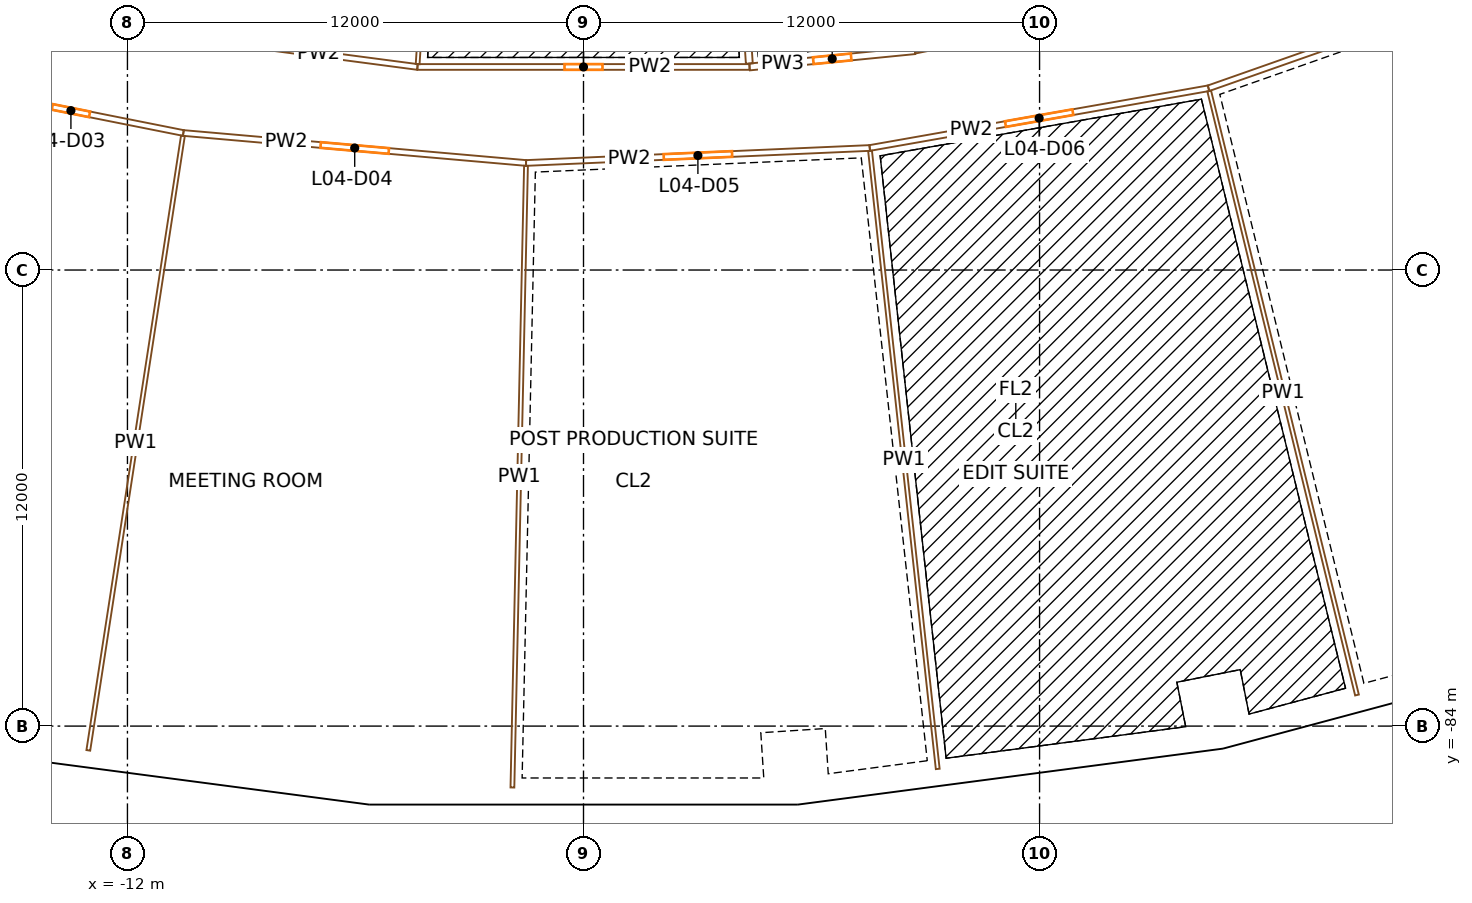
"""IFC4 building model, lengths in metres.
Left out: names, types, materials, properties, quantities, classifications, styles, units other than length and angle.
Written with IfcOpenShell. Run it as: python <this file> out.ifc"""

import sys

from ifc_helpers import new_model, si_unit, direction, frame, frame_2d, origin, origin_2d, place, context, subcontext, project, spatial, rectangle, extrude, element, fill, save


model = new_model("IFC4")
c1 = context("Model", 3, precision=1e-05, world=origin(), true_north=direction((0.0, 1.0)))
c2 = subcontext(c1, "Body", "Model", "MODEL_VIEW")
j1 = project(units=[si_unit("LENGTHUNIT", "METRE"), si_unit("PLANEANGLEUNIT", "RADIAN")], contexts=[c1])
p1 = place(None, origin())
s1 = spatial("IfcSite", under=j1, at=p1, CompositionType="ELEMENT")
p2 = place(p1, origin())
s2 = spatial("IfcBuilding", under=s1, at=p2, CompositionType="ELEMENT")
p3 = place(p2, frame((0.0, 0.0, 31.5)))
s3 = spatial("IfcBuildingStorey", under=s2, at=p3, CompositionType="ELEMENT", Elevation=31.5)
p4 = place(p3, frame((-5.085, -77.583, 0.0), z_axis=(0.0, 0.0, 1.0), x_axis=(0.997858923239, -0.06540312923, 0.0)))
e1 = element("IfcColumn", 1, at=p4, inside=s3, PredefinedType="COLUMN", context=c2, shape_type="SweptSolid", body=[
    extrude(rectangle(XDim=1.4, YDim=1.8, at=origin_2d()), origin(), (0.0, 0.0, 1.0), 4.5),
])
p5 = place(p3, frame((-5.576, -85.067, 0.0), z_axis=(0.0, 0.0, 1.0), x_axis=(0.997858923239, -0.06540312923, 0.0)))
e2 = element("IfcColumn", 2, at=p5, inside=s3, PredefinedType="COLUMN", context=c2, shape_type="SweptSolid", body=[
    extrude(rectangle(XDim=1.1, YDim=1.3, at=origin_2d()), origin(), (0.0, 0.0, 1.0), 4.5),
])
p6 = place(p3, frame((5.085, -77.583, 0.0), z_axis=(0.0, 0.0, 1.0), x_axis=(0.997858923239, 0.06540312923, 0.0)))
e3 = element("IfcColumn", 3, at=p6, inside=s3, PredefinedType="COLUMN", context=c2, shape_type="SweptSolid", body=[
    extrude(rectangle(XDim=1.4, YDim=1.8, at=origin_2d()), origin(), (0.0, 0.0, 1.0), 4.5),
])
p7 = place(p3, frame((5.576, -85.067, 0.0), z_axis=(0.0, 0.0, 1.0), x_axis=(0.997858923239, 0.06540312923, 0.0)))
e4 = element("IfcColumn", 4, at=p7, inside=s3, PredefinedType="COLUMN", context=c2, shape_type="SweptSolid", body=[
    extrude(rectangle(XDim=1.1, YDim=1.3, at=origin_2d()), origin(), (0.0, 0.0, 1.0), 4.5),
])
p8 = place(p3, frame((15.168, -76.256, 0.0), z_axis=(0.0, 0.0, 1.0), x_axis=(0.980785280403, 0.195090322016, 0.0)))
e5 = element("IfcColumn", 5, at=p8, inside=s3, PredefinedType="COLUMN", context=c2, shape_type="SweptSolid", body=[
    extrude(rectangle(XDim=1.4, YDim=1.8, at=origin_2d()), origin(), (0.0, 0.0, 1.0), 4.5),
])
p9 = place(p3, frame((16.631, -83.612, 0.0), z_axis=(0.0, 0.0, 1.0), x_axis=(0.980785280403, 0.195090322016, 0.0)))
e6 = element("IfcColumn", 6, at=p9, inside=s3, PredefinedType="COLUMN", context=c2, shape_type="SweptSolid", body=[
    extrude(rectangle(XDim=1.1, YDim=1.3, at=origin_2d()), origin(), (0.0, 0.0, 1.0), 4.5),
])
p10 = place(p3, frame((-5.656, -85.84, 0.0), z_axis=(0.0, 0.0, 1.0), x_axis=(1.0, 0.0, 0.0)))
e7 = element("IfcWall", 7, at=p10, inside=s3, PredefinedType="SOLIDWALL", context=c2, shape_type="SweptSolid", body=[
    extrude(rectangle(XDim=11.312, YDim=0.45, at=frame_2d((5.656, 0.0))), origin(), (0.0, 0.0, 1.0), 3.2),
])
p11 = place(p10, frame((4.006, 0.0, 0.9)))
e8 = element("IfcOpeningElement", 8, at=p11, cuts=e7, PredefinedType="OPENING", context=c2, shape_type="SweptSolid", body=[
    extrude(rectangle(XDim=1.2, YDim=2.15, at=frame_2d((0.6, 1.075))), frame((0.0, 0.235, 0.0), z_axis=(0.0, -1.0, 0.0), x_axis=(1.0, 0.0, 0.0)), (0.0, 0.0, 1.0), 0.47),
])
p12 = place(p10, frame((6.106, 0.0, 0.9)))
e9 = element("IfcOpeningElement", 9, at=p12, cuts=e7, PredefinedType="OPENING", context=c2, shape_type="SweptSolid", body=[
    extrude(rectangle(XDim=1.2, YDim=2.15, at=frame_2d((0.6, 1.075))), frame((0.0, 0.235, 0.0), z_axis=(0.0, -1.0, 0.0), x_axis=(1.0, 0.0, 0.0)), (0.0, 0.0, 1.0), 0.47),
])
p13 = place(p3, frame((5.685, -85.833, 0.0), z_axis=(0.0, 0.0, 1.0), x_axis=(0.991447502826, 0.130506126829, 0.0)))
e10 = element("IfcWall", 10, at=p13, inside=s3, PredefinedType="SOLIDWALL", context=c2, shape_type="SweptSolid", body=[
    extrude(rectangle(XDim=11.135, YDim=0.45, at=frame_2d((5.567, 0.0))), origin(), (0.0, 0.0, 1.0), 3.2),
])
p14 = place(p13, frame((3.917, 0.0, 0.9)))
e11 = element("IfcOpeningElement", 11, at=p14, cuts=e10, PredefinedType="OPENING", context=c2, shape_type="SweptSolid", body=[
    extrude(rectangle(XDim=1.2, YDim=2.15, at=frame_2d((0.6, 1.075))), frame((0.0, 0.235, 0.0), z_axis=(0.0, -1.0, 0.0), x_axis=(1.0, 0.0, 0.0)), (0.0, 0.0, 1.0), 0.47),
])
p15 = place(p13, frame((6.017, 0.0, 0.9)))
e12 = element("IfcOpeningElement", 12, at=p15, cuts=e10, PredefinedType="OPENING", context=c2, shape_type="SweptSolid", body=[
    extrude(rectangle(XDim=1.2, YDim=2.15, at=frame_2d((0.6, 1.075))), frame((0.0, 0.235, 0.0), z_axis=(0.0, -1.0, 0.0), x_axis=(1.0, 0.0, 0.0)), (0.0, 0.0, 1.0), 0.47),
])
p16 = place(p3, frame((16.754, -84.379, 0.0), z_axis=(0.0, 0.0, 1.0), x_axis=(0.965923678926, 0.258827059038, 0.0)))
e13 = element("IfcWall", 13, at=p16, inside=s3, PredefinedType="SOLIDWALL", context=c2, shape_type="SweptSolid", body=[
    extrude(rectangle(XDim=11.312, YDim=0.45, at=frame_2d((5.656, 0.0))), origin(), (0.0, 0.0, 1.0), 3.2),
])
p17 = place(p16, frame((4.006, 0.0, 0.9)))
e14 = element("IfcOpeningElement", 14, at=p17, cuts=e13, PredefinedType="OPENING", context=c2, shape_type="SweptSolid", body=[
    extrude(rectangle(XDim=1.2, YDim=2.15, at=frame_2d((0.6, 1.075))), frame((0.0, 0.235, 0.0), z_axis=(0.0, -1.0, 0.0), x_axis=(1.0, 0.0, 0.0)), (0.0, 0.0, 1.0), 0.47),
])
p18 = place(p16, frame((6.106, 0.0, 0.9)))
e15 = element("IfcOpeningElement", 15, at=p18, cuts=e13, PredefinedType="OPENING", context=c2, shape_type="SweptSolid", body=[
    extrude(rectangle(XDim=1.2, YDim=2.15, at=frame_2d((0.6, 1.075))), frame((0.0, 0.235, 0.0), z_axis=(0.0, -1.0, 0.0), x_axis=(1.0, 0.0, 0.0)), (0.0, 0.0, 1.0), 0.47),
])
p19 = place(p3, frame((-16.724, -84.379, 0.0), z_axis=(0.0, 0.0, 1.0), x_axis=(0.991447502826, -0.130506126829, 0.0)))
e16 = element("IfcWall", 16, at=p19, inside=s3, PredefinedType="SOLIDWALL", context=c2, shape_type="SweptSolid", body=[
    extrude(rectangle(XDim=11.135, YDim=0.45, at=frame_2d((5.567, 0.0))), origin(), (0.0, 0.0, 1.0), 3.2),
])
p20 = place(p19, frame((3.917, 0.0, 0.9)))
e17 = element("IfcOpeningElement", 17, at=p20, cuts=e16, PredefinedType="OPENING", context=c2, shape_type="SweptSolid", body=[
    extrude(rectangle(XDim=1.2, YDim=2.15, at=frame_2d((0.6, 1.075))), frame((0.0, 0.235, 0.0), z_axis=(0.0, -1.0, 0.0), x_axis=(1.0, 0.0, 0.0)), (0.0, 0.0, 1.0), 0.47),
])
p21 = place(p19, frame((6.017, 0.0, 0.9)))
e18 = element("IfcOpeningElement", 18, at=p21, cuts=e16, PredefinedType="OPENING", context=c2, shape_type="SweptSolid", body=[
    extrude(rectangle(XDim=1.2, YDim=2.15, at=frame_2d((0.6, 1.075))), frame((0.0, 0.235, 0.0), z_axis=(0.0, -1.0, 0.0), x_axis=(1.0, 0.0, 0.0)), (0.0, 0.0, 1.0), 0.47),
])
p22 = place(p3, frame((-10.529, -68.394, 0.0), z_axis=(0.0, 0.0, 1.0), x_axis=(-0.980785582749, 0.195088802015, 0.0)))
e19 = element("IfcWall", 19, at=p22, inside=s3, PredefinedType="PARTITIONING", context=c2, shape_type="SweptSolid", body=[
    extrude(rectangle(XDim=6.033, YDim=0.15, at=frame_2d((3.017, 0.0))), origin(), (0.0, 0.0, 1.0), 3.1),
])
p23 = place(p22, frame((2.517, 0.0, 0.0)))
e20 = element("IfcOpeningElement", 20, at=p23, cuts=e19, PredefinedType="OPENING", context=c2, shape_type="SweptSolid", body=[
    extrude(rectangle(XDim=1.0, YDim=2.1, at=frame_2d((0.5, 1.05))), frame((0.0, 0.085, 0.0), z_axis=(0.0, -1.0, 0.0), x_axis=(1.0, 0.0, 0.0)), (0.0, 0.0, 1.0), 0.17),
])
p24 = place(p3, frame((-13.03, -84.639, 0.0), z_axis=(0.0, 0.0, 1.0), x_axis=(0.15214688942, 0.988357892689, 0.0)))
e21 = element("IfcWall", 21, at=p24, inside=s3, PredefinedType="PARTITIONING", context=c2, shape_type="SweptSolid", body=[
    extrude(rectangle(XDim=16.361, YDim=0.1, at=frame_2d((8.18, 0.0))), origin(), (0.0, 0.0, 1.0), 3.1),
])
p25 = place(p3, frame((-13.032, -65.516, 0.0), z_axis=(0.0, 0.0, 1.0), x_axis=(0.991443260322, -0.130538352841, 0.0)))
e22 = element("IfcWall", 22, at=p25, inside=s3, PredefinedType="PARTITIONING", context=c2, shape_type="SweptSolid", body=[
    extrude(rectangle(XDim=8.738, YDim=0.15, at=frame_2d((4.369, 0.0))), origin(), (0.0, 0.0, 1.0), 3.1),
])
p26 = place(p25, frame((3.869, 0.0, 0.0)))
e23 = element("IfcOpeningElement", 23, at=p26, cuts=e22, PredefinedType="OPENING", context=c2, shape_type="SweptSolid", body=[
    extrude(rectangle(XDim=1.0, YDim=2.1, at=frame_2d((0.5, 1.05))), frame((0.0, 0.085, 0.0), z_axis=(0.0, -1.0, 0.0), x_axis=(1.0, 0.0, 0.0)), (0.0, 0.0, 1.0), 0.17),
])
p27 = place(p3, frame((-1.511, -69.184, 0.0), z_axis=(0.0, 0.0, 1.0), x_axis=(-0.996190935779, 0.087198735491, 0.0)))
e24 = element("IfcWall", 24, at=p27, inside=s3, PredefinedType="PARTITIONING", context=c2, shape_type="SweptSolid", body=[
    extrude(rectangle(XDim=9.052, YDim=0.15, at=frame_2d((4.526, 0.0))), origin(), (0.0, 0.0, 1.0), 3.1),
])
p28 = place(p27, frame((3.626, 0.0, 0.0)))
e25 = element("IfcOpeningElement", 25, at=p28, cuts=e24, PredefinedType="OPENING", context=c2, shape_type="SweptSolid", body=[
    extrude(rectangle(XDim=1.8, YDim=2.1, at=frame_2d((0.9, 1.05))), frame((0.0, 0.085, 0.0), z_axis=(0.0, -1.0, 0.0), x_axis=(1.0, 0.0, 0.0)), (0.0, 0.0, 1.0), 0.17),
])
p29 = place(p3, frame((-4.369, -66.657, 0.0), z_axis=(0.0, 0.0, 1.0), x_axis=(1.0, 0.0, 0.0)))
e26 = element("IfcWall", 26, at=p29, inside=s3, PredefinedType="PARTITIONING", context=c2, shape_type="SweptSolid", body=[
    extrude(rectangle(XDim=8.738, YDim=0.15, at=frame_2d((4.369, 0.0))), origin(), (0.0, 0.0, 1.0), 3.1),
])
p30 = place(p29, frame((3.869, 0.0, 0.0)))
e27 = element("IfcOpeningElement", 27, at=p30, cuts=e26, PredefinedType="OPENING", context=c2, shape_type="SweptSolid", body=[
    extrude(rectangle(XDim=1.0, YDim=2.1, at=frame_2d((0.5, 1.05))), frame((0.0, 0.085, 0.0), z_axis=(0.0, -1.0, 0.0), x_axis=(1.0, 0.0, 0.0)), (0.0, 0.0, 1.0), 0.17),
])
p31 = place(p3, frame((-3.283, -50.093, 0.0), z_axis=(0.0, 0.0, 1.0), x_axis=(-0.065405026615, -0.997858798876, 0.0)))
e28 = element("IfcWall", 28, at=p31, inside=s3, PredefinedType="PARTITIONING", context=c2, shape_type="SweptSolid", body=[
    extrude(rectangle(XDim=16.525, YDim=0.1, at=frame_2d((8.262, 0.0))), origin(), (0.0, 0.0, 1.0), 3.1),
])
p32 = place(p3, frame((-1.871, -85.615, 0.0), z_axis=(0.0, 0.0, 1.0), x_axis=(0.021846183574, 0.999761343653, 0.0)))
e29 = element("IfcWall", 29, at=p32, inside=s3, PredefinedType="PARTITIONING", context=c2, shape_type="SweptSolid", body=[
    extrude(rectangle(XDim=16.361, YDim=0.1, at=frame_2d((8.18, 0.0))), origin(), (0.0, 0.0, 1.0), 3.1),
])
p33 = place(p3, frame((7.532, -68.789, 0.0), z_axis=(0.0, 0.0, 1.0), x_axis=(-0.999048509506, -0.043612792308, 0.0)))
e30 = element("IfcWall", 30, at=p33, inside=s3, PredefinedType="PARTITIONING", context=c2, shape_type="SweptSolid", body=[
    extrude(rectangle(XDim=9.052, YDim=0.15, at=frame_2d((4.526, 0.0))), origin(), (0.0, 0.0, 1.0), 3.1),
])
p34 = place(p33, frame((3.626, 0.0, 0.0)))
e31 = element("IfcOpeningElement", 31, at=p34, cuts=e30, PredefinedType="OPENING", context=c2, shape_type="SweptSolid", body=[
    extrude(rectangle(XDim=1.8, YDim=2.1, at=frame_2d((0.9, 1.05))), frame((0.0, 0.085, 0.0), z_axis=(0.0, -1.0, 0.0), x_axis=(1.0, 0.0, 0.0)), (0.0, 0.0, 1.0), 0.17),
])
p35 = place(p3, frame((3.283, -50.093, 0.0), z_axis=(0.0, 0.0, 1.0), x_axis=(0.065405001109, -0.997858800547, 0.0)))
e32 = element("IfcWall", 32, at=p35, inside=s3, PredefinedType="PARTITIONING", context=c2, shape_type="SweptSolid", body=[
    extrude(rectangle(XDim=16.51, YDim=0.18, at=frame_2d((8.255, 0.0))), origin(), (0.0, 0.0, 1.0), 3.1),
])
p36 = place(p3, frame((4.369, -66.657, 0.0), z_axis=(0.0, 0.0, 1.0), x_axis=(0.995184826457, 0.098016127192, 0.0)))
e33 = element("IfcWall", 33, at=p36, inside=s3, PredefinedType="PARTITIONING", context=c2, shape_type="SweptSolid", body=[
    extrude(rectangle(XDim=4.371, YDim=0.18, at=frame_2d((2.186, 0.0))), origin(), (0.0, 0.0, 1.0), 3.1),
])
p37 = place(p36, frame((1.686, 0.0, 0.0)))
e34 = element("IfcOpeningElement", 34, at=p37, cuts=e33, PredefinedType="OPENING", context=c2, shape_type="SweptSolid", body=[
    extrude(rectangle(XDim=1.0, YDim=2.1, at=frame_2d((0.5, 1.05))), frame((0.0, 0.1, 0.0), z_axis=(0.0, -1.0, 0.0), x_axis=(1.0, 0.0, 0.0)), (0.0, 0.0, 1.0), 0.2),
])
p38 = place(p3, frame((16.446, -67.217, 0.0), z_axis=(0.0, 0.0, 1.0), x_axis=(-0.984813412134, -0.173616080133, 0.0)))
e35 = element("IfcWall", 35, at=p38, inside=s3, PredefinedType="PARTITIONING", context=c2, shape_type="SweptSolid", body=[
    extrude(rectangle(XDim=9.052, YDim=0.15, at=frame_2d((4.526, 0.0))), origin(), (0.0, 0.0, 1.0), 3.1),
])
p39 = place(p38, frame((3.626, 0.0, 0.0)))
e36 = element("IfcOpeningElement", 36, at=p39, cuts=e35, PredefinedType="OPENING", context=c2, shape_type="SweptSolid", body=[
    extrude(rectangle(XDim=1.8, YDim=2.1, at=frame_2d((0.9, 1.05))), frame((0.0, 0.085, 0.0), z_axis=(0.0, -1.0, 0.0), x_axis=(1.0, 0.0, 0.0)), (0.0, 0.0, 1.0), 0.17),
])
p40 = place(p3, frame((8.719, -66.229, 0.0), z_axis=(0.0, 0.0, 1.0), x_axis=(0.980786466832, 0.195084357342, 0.0)))
e37 = element("IfcWall", 37, at=p40, inside=s3, PredefinedType="PARTITIONING", context=c2, shape_type="SweptSolid", body=[
    extrude(rectangle(XDim=8.738, YDim=0.15, at=frame_2d((4.369, 0.0))), origin(), (0.0, 0.0, 1.0), 3.1),
])
p41 = place(p40, frame((3.869, 0.0, 0.0)))
e38 = element("IfcOpeningElement", 38, at=p41, cuts=e37, PredefinedType="OPENING", context=c2, shape_type="SweptSolid", body=[
    extrude(rectangle(XDim=1.0, YDim=2.1, at=frame_2d((0.5, 1.05))), frame((0.0, 0.085, 0.0), z_axis=(0.0, -1.0, 0.0), x_axis=(1.0, 0.0, 0.0)), (0.0, 0.0, 1.0), 0.17),
])
p42 = place(p3, frame((9.321, -85.127, 0.0), z_axis=(0.0, 0.0, 1.0), x_axis=(-0.1088427139, 0.99405898398, 0.0)))
e39 = element("IfcWall", 39, at=p42, inside=s3, PredefinedType="PARTITIONING", context=c2, shape_type="SweptSolid", body=[
    extrude(rectangle(XDim=16.361, YDim=0.1, at=frame_2d((8.18, 0.0))), origin(), (0.0, 0.0, 1.0), 3.1),
])
p43 = place(p3, frame((29.175, -62.741, 0.0), z_axis=(0.0, 0.0, 1.0), x_axis=(-0.94336986797, -0.33174281033, 0.0)))
e40 = element("IfcWall", 40, at=p43, inside=s3, PredefinedType="PARTITIONING", context=c2, shape_type="SweptSolid", body=[
    extrude(rectangle(XDim=13.493, YDim=0.15, at=frame_2d((6.746, 0.0))), origin(), (0.0, 0.0, 1.0), 3.1),
])
p44 = place(p43, frame((5.846, 0.0, 0.0)))
e41 = element("IfcOpeningElement", 41, at=p44, cuts=e40, PredefinedType="OPENING", context=c2, shape_type="SweptSolid", body=[
    extrude(rectangle(XDim=1.8, YDim=2.1, at=frame_2d((0.9, 1.05))), frame((0.0, 0.085, 0.0), z_axis=(0.0, -1.0, 0.0), x_axis=(1.0, 0.0, 0.0)), (0.0, 0.0, 1.0), 0.17),
])
p45 = place(p3, frame((20.352, -83.182, 0.0), z_axis=(0.0, 0.0, 1.0), x_axis=(-0.23765209547, 0.971350339228, 0.0)))
e42 = element("IfcWall", 42, at=p45, inside=s3, PredefinedType="PARTITIONING", context=c2, shape_type="SweptSolid", body=[
    extrude(rectangle(XDim=16.361, YDim=0.1, at=frame_2d((8.18, 0.0))), origin(), (0.0, 0.0, 1.0), 3.1),
])
p46 = place(p20, origin())
e43 = element("IfcWindow", 43, at=p46, inside=s3, PartitioningType="SINGLE_PANEL", PredefinedType="WINDOW", context=c2, shape_type="SweptSolid", body=[
    extrude(rectangle(XDim=1.2, YDim=2.15, at=frame_2d((0.6, 1.075))), frame((0.0, 0.03, 0.0), z_axis=(0.0, -1.0, 0.0), x_axis=(1.0, 0.0, 0.0)), (0.0, 0.0, 1.0), 0.06),
])
fill(e17, e43)
p47 = place(p21, origin())
e44 = element("IfcWindow", 44, at=p47, inside=s3, PartitioningType="SINGLE_PANEL", PredefinedType="WINDOW", context=c2, shape_type="SweptSolid", body=[
    extrude(rectangle(XDim=1.2, YDim=2.15, at=frame_2d((0.6, 1.075))), frame((0.0, 0.03, 0.0), z_axis=(0.0, -1.0, 0.0), x_axis=(1.0, 0.0, 0.0)), (0.0, 0.0, 1.0), 0.06),
])
fill(e18, e44)
p48 = place(p11, origin())
e45 = element("IfcWindow", 45, at=p48, inside=s3, PartitioningType="SINGLE_PANEL", PredefinedType="WINDOW", context=c2, shape_type="SweptSolid", body=[
    extrude(rectangle(XDim=1.2, YDim=2.15, at=frame_2d((0.6, 1.075))), frame((0.0, 0.03, 0.0), z_axis=(0.0, -1.0, 0.0), x_axis=(1.0, 0.0, 0.0)), (0.0, 0.0, 1.0), 0.06),
])
fill(e8, e45)
p49 = place(p12, origin())
e46 = element("IfcWindow", 46, at=p49, inside=s3, PartitioningType="SINGLE_PANEL", PredefinedType="WINDOW", context=c2, shape_type="SweptSolid", body=[
    extrude(rectangle(XDim=1.2, YDim=2.15, at=frame_2d((0.6, 1.075))), frame((0.0, 0.03, 0.0), z_axis=(0.0, -1.0, 0.0), x_axis=(1.0, 0.0, 0.0)), (0.0, 0.0, 1.0), 0.06),
])
fill(e9, e46)
p50 = place(p14, origin())
e47 = element("IfcWindow", 47, at=p50, inside=s3, PartitioningType="SINGLE_PANEL", PredefinedType="WINDOW", context=c2, shape_type="SweptSolid", body=[
    extrude(rectangle(XDim=1.2, YDim=2.15, at=frame_2d((0.6, 1.075))), frame((0.0, 0.03, 0.0), z_axis=(0.0, -1.0, 0.0), x_axis=(1.0, 0.0, 0.0)), (0.0, 0.0, 1.0), 0.06),
])
fill(e11, e47)
p51 = place(p15, origin())
e48 = element("IfcWindow", 48, at=p51, inside=s3, PartitioningType="SINGLE_PANEL", PredefinedType="WINDOW", context=c2, shape_type="SweptSolid", body=[
    extrude(rectangle(XDim=1.2, YDim=2.15, at=frame_2d((0.6, 1.075))), frame((0.0, 0.03, 0.0), z_axis=(0.0, -1.0, 0.0), x_axis=(1.0, 0.0, 0.0)), (0.0, 0.0, 1.0), 0.06),
])
fill(e12, e48)
p52 = place(p17, origin())
e49 = element("IfcWindow", 49, at=p52, inside=s3, PartitioningType="SINGLE_PANEL", PredefinedType="WINDOW", context=c2, shape_type="SweptSolid", body=[
    extrude(rectangle(XDim=1.2, YDim=2.15, at=frame_2d((0.6, 1.075))), frame((0.0, 0.03, 0.0), z_axis=(0.0, -1.0, 0.0), x_axis=(1.0, 0.0, 0.0)), (0.0, 0.0, 1.0), 0.06),
])
fill(e14, e49)
p53 = place(p23, origin())
e50 = element("IfcDoor", 50, at=p53, inside=s3, OperationType="SINGLE_SWING_RIGHT", PredefinedType="DOOR", context=c2, shape_type="SweptSolid", body=[
    extrude(rectangle(XDim=1.0, YDim=2.1, at=frame_2d((0.5, 1.05))), frame((0.0, 0.025, 0.0), z_axis=(0.0, -1.0, 0.0), x_axis=(1.0, 0.0, 0.0)), (0.0, 0.0, 1.0), 0.05),
])
fill(e20, e50)
p54 = place(p28, origin())
e51 = element("IfcDoor", 51, at=p54, inside=s3, OperationType="DOUBLE_DOOR_SINGLE_SWING", PredefinedType="DOOR", context=c2, shape_type="SweptSolid", body=[
    extrude(rectangle(XDim=1.8, YDim=2.1, at=frame_2d((0.9, 1.05))), frame((0.0, 0.025, 0.0), z_axis=(0.0, -1.0, 0.0), x_axis=(1.0, 0.0, 0.0)), (0.0, 0.0, 1.0), 0.05),
])
fill(e25, e51)
p55 = place(p34, origin())
e52 = element("IfcDoor", 52, at=p55, inside=s3, OperationType="DOUBLE_DOOR_SINGLE_SWING", PredefinedType="DOOR", context=c2, shape_type="SweptSolid", body=[
    extrude(rectangle(XDim=1.8, YDim=2.1, at=frame_2d((0.9, 1.05))), frame((0.0, 0.025, 0.0), z_axis=(0.0, -1.0, 0.0), x_axis=(1.0, 0.0, 0.0)), (0.0, 0.0, 1.0), 0.05),
])
fill(e31, e52)
p56 = place(p39, origin())
e53 = element("IfcDoor", 53, at=p56, inside=s3, OperationType="DOUBLE_DOOR_SINGLE_SWING", PredefinedType="DOOR", context=c2, shape_type="SweptSolid", body=[
    extrude(rectangle(XDim=1.8, YDim=2.1, at=frame_2d((0.9, 1.05))), frame((0.0, 0.025, 0.0), z_axis=(0.0, -1.0, 0.0), x_axis=(1.0, 0.0, 0.0)), (0.0, 0.0, 1.0), 0.05),
])
fill(e36, e53)
p57 = place(p30, origin())
e54 = element("IfcDoor", 54, at=p57, inside=s3, OperationType="SINGLE_SWING_RIGHT", PredefinedType="DOOR", context=c2, shape_type="SweptSolid", body=[
    extrude(rectangle(XDim=1.0, YDim=2.1, at=frame_2d((0.5, 1.05))), frame((0.0, 0.025, 0.0), z_axis=(0.0, -1.0, 0.0), x_axis=(1.0, 0.0, 0.0)), (0.0, 0.0, 1.0), 0.05),
])
fill(e27, e54)
p58 = place(p37, origin())
e55 = element("IfcDoor", 55, at=p58, inside=s3, OperationType="SINGLE_SWING_RIGHT", PredefinedType="DOOR", context=c2, shape_type="SweptSolid", body=[
    extrude(rectangle(XDim=1.0, YDim=2.1, at=frame_2d((0.5, 1.05))), frame((0.0, 0.025, 0.0), z_axis=(0.0, -1.0, 0.0), x_axis=(1.0, 0.0, 0.0)), (0.0, 0.0, 1.0), 0.05),
])
fill(e34, e55)
save(model, sys.argv[1])
